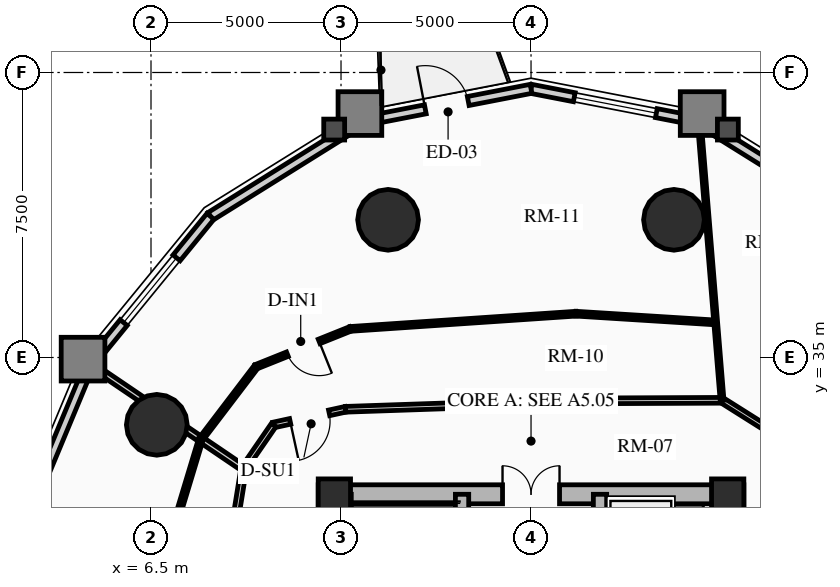
"""IFC4 building model, lengths in metres.
Left out: names, types, materials, properties, quantities, classifications, styles, units other than length and angle.
Written with IfcOpenShell. Run it as: python <this file> out.ifc"""

import sys

from ifc_helpers import new_model, si_unit, direction, frame, frame_2d, origin, origin_2d, place, context, subcontext, project, spatial, rectangle, circle, extrude, source, transform, mapped, element, fill, save


model = new_model("IFC4")
c1 = context("Model", 3, precision=1e-05, world=origin(), true_north=direction((0.0, 1.0)))
c2 = subcontext(c1, "Body", "Model", "MODEL_VIEW")
j1 = project(units=[si_unit("LENGTHUNIT", "METRE"), si_unit("PLANEANGLEUNIT", "RADIAN")], contexts=[c1])
p1 = place(None, origin())
s1 = spatial("IfcSite", under=j1, at=p1, CompositionType="ELEMENT")
p2 = place(p1, origin())
s2 = spatial("IfcBuilding", under=s1, at=p2, CompositionType="ELEMENT")
p3 = place(p2, frame((0.0, 0.0, 22.0)))
s3 = spatial("IfcBuildingStorey", under=s2, at=p3, CompositionType="ELEMENT", Elevation=22.0)
for number, where, z_axis, x_axis in (
    (1, (11.15, 17.35, 0.0), (0.0, 0.0, 1.0), (0.0, 1.0, 0.0)),
    (2, (21.85, 17.35, 0.0), (0.0, 0.0, 1.0), (0.0, 1.0, 0.0)),
):
    element("IfcWall", number, at=place(p3, frame(where, z_axis=z_axis, x_axis=x_axis)), inside=s3, PredefinedType="SHEAR", context=c2, shape_type="SweptSolid", body=[
        extrude(rectangle(XDim=14.3, YDim=0.5, at=frame_2d((7.15, 0.0))), origin(), (0.0, 0.0, 1.0), 2.91),
    ])
p4 = place(p3, frame((11.15, 31.4, 0.0), z_axis=(0.0, 0.0, 1.0), x_axis=(1.0, 0.0, 0.0)))
e3 = element("IfcWall", 3, at=p4, inside=s3, PredefinedType="SHEAR", context=c2, shape_type="SweptSolid", body=[
    extrude(rectangle(XDim=10.7, YDim=0.5, at=frame_2d((5.35, 0.0))), origin(), (0.0, 0.0, 1.0), 2.91),
])
m1 = source(origin(), c2, "Body", "SweptSolid", [
    extrude(rectangle(XDim=1.5, YDim=2.02, at=frame_2d((0.75, 1.01))), frame((0.0, 0.26, 0.0), z_axis=(0.0, -1.0, 0.0), x_axis=(1.0, 0.0, 0.0)), (0.0, 0.0, 1.0), 0.52),
])
p5 = place(p4, frame((4.6, 0.0, 0.0)))
e4 = element("IfcOpeningElement", 4, at=p5, cuts=e3, PredefinedType="OPENING", context=c2, shape_type="MappedRepresentation", body=[
    mapped(m1, transform((0.0, 0.0, 0.0), x_axis=(1.0, 0.0, 0.0), y_axis=(0.0, 1.0, 0.0), z_axis=(0.0, 0.0, 1.0), scale=1.0)),
])
p6 = place(p3, frame((14.685, 17.6, 0.0), z_axis=(0.0, 0.0, 1.0), x_axis=(0.0, 1.0, 0.0)))
e5 = element("IfcWall", 5, at=p6, inside=s3, PredefinedType="SHEAR", context=c2, shape_type="SweptSolid", body=[
    extrude(rectangle(XDim=13.8, YDim=0.35, at=frame_2d((6.9, 0.0))), origin(), (0.0, 0.0, 1.0), 2.91),
])
m2 = source(origin(), c2, "Body", "SweptSolid", [
    extrude(rectangle(XDim=1.1, YDim=2.015, at=frame_2d((0.55, 1.007))), frame((0.0, 0.185, 0.0), z_axis=(0.0, -1.0, 0.0), x_axis=(1.0, 0.0, 0.0)), (0.0, 0.0, 1.0), 0.37),
])
p7 = place(p6, frame((4.9, 0.0, 0.0)))
e6 = element("IfcOpeningElement", 6, at=p7, cuts=e5, PredefinedType="OPENING", context=c2, shape_type="MappedRepresentation", body=[
    mapped(m2, transform((0.0, 0.0, 0.0), x_axis=(1.0, 0.0, 0.0), y_axis=(0.0, 1.0, 0.0), z_axis=(0.0, 0.0, 1.0), scale=1.0)),
])
m3 = source(origin(), c2, "Body", "SweptSolid", [
    extrude(rectangle(XDim=1.15, YDim=2.02, at=frame_2d((0.575, 1.01))), frame((0.0, 0.185, 0.0), z_axis=(0.0, -1.0, 0.0), x_axis=(1.0, 0.0, 0.0)), (0.0, 0.0, 1.0), 0.37),
])
p8 = place(p6, frame((7.32, 0.0, 0.0)))
e7 = element("IfcOpeningElement", 7, at=p8, cuts=e5, PredefinedType="OPENING", context=c2, shape_type="MappedRepresentation", body=[
    mapped(m3, transform((0.0, 0.0, 0.0), x_axis=(1.0, 0.0, 0.0), y_axis=(0.0, 1.0, 0.0), z_axis=(0.0, 0.0, 1.0), scale=1.0)),
])
p9 = place(p3, frame((18.315, 17.6, 0.0), z_axis=(0.0, 0.0, 1.0), x_axis=(0.0, 1.0, 0.0)))
e8 = element("IfcWall", 8, at=p9, inside=s3, PredefinedType="SHEAR", context=c2, shape_type="SweptSolid", body=[
    extrude(rectangle(XDim=13.8, YDim=0.35, at=frame_2d((6.9, 0.0))), origin(), (0.0, 0.0, 1.0), 2.91),
])
p10 = place(p9, frame((10.025, 0.0, 0.0)))
e9 = element("IfcOpeningElement", 9, at=p10, cuts=e8, PredefinedType="OPENING", context=c2, shape_type="MappedRepresentation", body=[
    mapped(m2, transform((0.0, 0.0, 0.0), x_axis=(1.0, 0.0, 0.0), y_axis=(0.0, 1.0, 0.0), z_axis=(0.0, 0.0, 1.0), scale=1.0)),
])
p11 = place(p9, frame((12.025, 0.0, 0.0)))
e10 = element("IfcOpeningElement", 10, at=p11, cuts=e8, PredefinedType="OPENING", context=c2, shape_type="MappedRepresentation", body=[
    mapped(m2, transform((0.0, 0.0, 0.0), x_axis=(1.0, 0.0, 0.0), y_axis=(0.0, 1.0, 0.0), z_axis=(0.0, 0.0, 1.0), scale=1.0)),
])
p12 = place(p9, frame((5.33, 0.0, 0.0)))
e11 = element("IfcOpeningElement", 11, at=p12, cuts=e8, PredefinedType="OPENING", context=c2, shape_type="MappedRepresentation", body=[
    mapped(m3, transform((0.0, 0.0, 0.0), x_axis=(1.0, 0.0, 0.0), y_axis=(0.0, 1.0, 0.0), z_axis=(0.0, 0.0, 1.0), scale=1.0)),
])
p13 = place(p3, frame((11.595, 24.655, 0.0), z_axis=(0.0, 0.0, 1.0), x_axis=(0.0, 1.0, 0.0)))
e12 = element("IfcWall", 12, at=p13, inside=s3, PredefinedType="SHEAR", context=c2, shape_type="SweptSolid", body=[
    extrude(rectangle(XDim=6.745, YDim=0.35, at=frame_2d((3.373, 0.0))), origin(), (0.0, 0.0, 1.0), 2.91),
])
for number, where, z_axis, x_axis in (
    (13, (11.325, 31.38, 0.0), (0.0, 0.0, 1.0), (1.0, 0.0, 0.0)),
    (14, (21.675, 31.38, 0.0), (0.0, 0.0, 1.0), (1.0, 0.0, 0.0)),
):
    element("IfcColumn", number, at=place(p3, frame(where, z_axis=z_axis, x_axis=x_axis)), inside=s3, PredefinedType="COLUMN", context=c2, shape_type="SweptSolid", body=[
        extrude(rectangle(XDim=0.85, YDim=0.85, at=origin_2d()), origin(), (0.0, 0.0, 1.0), 2.91),
    ])
for number, where, z_axis, x_axis in (
    (15, (20.261, 38.623, 0.0), (0.0, 0.0, 1.0), (1.0, 0.0, 0.0)),
    (16, (12.739, 38.623, 0.0), (0.0, 0.0, 1.0), (1.0, 0.0, 0.0)),
    (17, (6.653, 33.229, 0.0), (0.0, 0.0, 1.0), (1.0, 0.0, 0.0)),
):
    element("IfcColumn", number, at=place(p3, frame(where, z_axis=z_axis, x_axis=x_axis)), inside=s3, PredefinedType="USERDEFINED", context=c2, shape_type="SweptSolid", body=[
        extrude(circle(Radius=0.8, at=origin_2d()), origin(), (0.0, 0.0, 1.0), 2.91),
    ])
p14 = place(p3, frame((20.935, 41.21, 0.0), z_axis=(0.0, 0.0, 1.0), x_axis=(0.848422721916, -0.529319265601, 0.0)))
e18 = element("IfcWall", 18, at=p14, inside=s3, PredefinedType="SOLIDWALL", context=c2, shape_type="SweptSolid", body=[
    extrude(rectangle(XDim=4.715, YDim=0.24, at=frame_2d((2.357, 0.0))), origin(), (0.0, 0.0, 1.0), 2.073),
])
p15 = place(p3, frame((16.5, 42.07, 0.0), z_axis=(0.0, 0.0, 1.0), x_axis=(0.981717351035, -0.190344536766, 0.0)))
e19 = element("IfcWall", 19, at=p15, inside=s3, PredefinedType="SOLIDWALL", context=c2, shape_type="SweptSolid", body=[
    extrude(rectangle(XDim=4.517, YDim=0.24, at=frame_2d((2.259, 0.0))), origin(), (0.0, 0.0, 1.0), 2.073),
])
m4 = source(origin(), c2, "Body", "SweptSolid", [
    extrude(rectangle(XDim=2.2, YDim=1.35, at=frame_2d((1.1, 0.675))), frame((0.0, 0.13, 0.0), z_axis=(0.0, -1.0, 0.0), x_axis=(1.0, 0.0, 0.0)), (0.0, 0.0, 1.0), 0.26),
])
p16 = place(p15, frame((1.159, 0.0, 0.65)))
e20 = element("IfcOpeningElement", 20, at=p16, cuts=e19, PredefinedType="OPENING", context=c2, shape_type="MappedRepresentation", body=[
    mapped(m4, transform((0.0, 0.0, 0.0), x_axis=(1.0, 0.0, 0.0), y_axis=(0.0, 1.0, 0.0), z_axis=(0.0, 0.0, 1.0), scale=1.0)),
])
p17 = place(p3, frame((12.065, 41.21, 0.0), z_axis=(0.0, 0.0, 1.0), x_axis=(0.981717351035, 0.190344536766, 0.0)))
e21 = element("IfcWall", 21, at=p17, inside=s3, PredefinedType="SOLIDWALL", context=c2, shape_type="SweptSolid", body=[
    extrude(rectangle(XDim=4.517, YDim=0.24, at=frame_2d((2.259, 0.0))), origin(), (0.0, 0.0, 1.0), 2.073),
])
m5 = source(origin(), c2, "Body", "SweptSolid", [
    extrude(rectangle(XDim=1.15, YDim=2.005, at=frame_2d((0.575, 1.002))), frame((0.0, 0.13, 0.0), z_axis=(0.0, -1.0, 0.0), x_axis=(1.0, 0.0, 0.0)), (0.0, 0.0, 1.0), 0.26),
])
p18 = place(p17, frame((1.684, 0.0, 0.0)))
e22 = element("IfcOpeningElement", 22, at=p18, cuts=e21, PredefinedType="OPENING", context=c2, shape_type="MappedRepresentation", body=[
    mapped(m5, transform((0.0, 0.0, 0.0), x_axis=(1.0, 0.0, 0.0), y_axis=(0.0, 1.0, 0.0), z_axis=(0.0, 0.0, 1.0), scale=1.0)),
])
p19 = place(p3, frame((8.065, 38.714, 0.0), z_axis=(0.0, 0.0, 1.0), x_axis=(0.848422721916, 0.529319265601, 0.0)))
e23 = element("IfcWall", 23, at=p19, inside=s3, PredefinedType="SOLIDWALL", context=c2, shape_type="SweptSolid", body=[
    extrude(rectangle(XDim=4.715, YDim=0.24, at=frame_2d((2.357, 0.0))), origin(), (0.0, 0.0, 1.0), 2.073),
])
p20 = place(p3, frame((4.89, 34.827, 0.0), z_axis=(0.0, 0.0, 1.0), x_axis=(0.632588557044, 0.774488035735, 0.0)))
e24 = element("IfcWall", 24, at=p20, inside=s3, PredefinedType="SOLIDWALL", context=c2, shape_type="SweptSolid", body=[
    extrude(rectangle(XDim=5.019, YDim=0.24, at=frame_2d((2.509, 0.0))), origin(), (0.0, 0.0, 1.0), 2.073),
])
p21 = place(p20, frame((1.409, 0.0, 0.65)))
e25 = element("IfcOpeningElement", 25, at=p21, cuts=e24, PredefinedType="OPENING", context=c2, shape_type="MappedRepresentation", body=[
    mapped(m4, transform((0.0, 0.0, 0.0), x_axis=(1.0, 0.0, 0.0), y_axis=(0.0, 1.0, 0.0), z_axis=(0.0, 0.0, 1.0), scale=1.0)),
])
p22 = place(p3, frame((2.851, 29.929, 0.0), z_axis=(0.0, 0.0, 1.0), x_axis=(0.384255919668, 0.923226618009, 0.0)))
e26 = element("IfcWall", 26, at=p22, inside=s3, PredefinedType="SOLIDWALL", context=c2, shape_type="SweptSolid", body=[
    extrude(rectangle(XDim=5.305, YDim=0.24, at=frame_2d((2.653, 0.0))), origin(), (0.0, 0.0, 1.0), 2.073),
])
p23 = place(p3, frame((22.877, 33.022, 0.0), z_axis=(0.0, 0.0, 1.0), x_axis=(-0.845895608855, 0.533348496689, 0.0)))
e27 = element("IfcWall", 27, at=p23, inside=s3, PredefinedType="PARTITIONING", context=c2, shape_type="SweptSolid", body=[
    extrude(rectangle(XDim=1.597, YDim=0.15, at=frame_2d((0.798, 0.0))), origin(), (0.0, 0.0, 1.0), 2.205),
])
p24 = place(p3, frame((21.527, 33.873, 0.0), z_axis=(0.0, 0.0, 1.0), x_axis=(-0.999991838845, -0.004040079574, 0.0)))
e28 = element("IfcWall", 28, at=p24, inside=s3, PredefinedType="PARTITIONING", context=c2, shape_type="SweptSolid", body=[
    extrude(rectangle(XDim=3.384, YDim=0.15, at=frame_2d((1.692, 0.0))), origin(), (0.0, 0.0, 1.0), 2.159),
])
p25 = place(p3, frame((18.143, 33.86, 0.0), z_axis=(0.0, 0.0, 1.0), x_axis=(-0.999419208319, -0.034077060363, 0.0)))
e29 = element("IfcWall", 29, at=p25, inside=s3, PredefinedType="PARTITIONING", context=c2, shape_type="SweptSolid", body=[
    extrude(rectangle(XDim=6.527, YDim=0.15, at=frame_2d((3.263, 0.0))), origin(), (0.0, 0.0, 1.0), 2.159),
])
p26 = place(p3, frame((11.62, 33.637, 0.0), z_axis=(0.0, 0.0, 1.0), x_axis=(-0.97702579435, -0.213121085711, 0.0)))
e30 = element("IfcWall", 30, at=p26, inside=s3, PredefinedType="PARTITIONING", context=c2, shape_type="SweptSolid", body=[
    extrude(rectangle(XDim=1.935, YDim=0.15, at=frame_2d((0.967, 0.0))), origin(), (0.0, 0.0, 1.0), 2.159),
])
m6 = source(origin(), c2, "Body", "SweptSolid", [
    extrude(rectangle(XDim=1.05, YDim=2.015, at=frame_2d((0.525, 1.007))), frame((0.0, 0.085, 0.0), z_axis=(0.0, -1.0, 0.0), x_axis=(1.0, 0.0, 0.0)), (0.0, 0.0, 1.0), 0.17),
])
p27 = place(p26, frame((0.442, 0.0, 0.0)))
e31 = element("IfcOpeningElement", 31, at=p27, cuts=e30, PredefinedType="OPENING", context=c2, shape_type="MappedRepresentation", body=[
    mapped(m6, transform((0.0, 0.0, 0.0), x_axis=(1.0, 0.0, 0.0), y_axis=(0.0, 1.0, 0.0), z_axis=(0.0, 0.0, 1.0), scale=1.0)),
])
p28 = place(p3, frame((9.729, 33.225, 0.0), z_axis=(0.0, 0.0, 1.0), x_axis=(-0.567183649484, -0.82359134755, 0.0)))
e32 = element("IfcWall", 32, at=p28, inside=s3, PredefinedType="PARTITIONING", context=c2, shape_type="SweptSolid", body=[
    extrude(rectangle(XDim=1.392, YDim=0.15, at=frame_2d((0.696, 0.0))), origin(), (0.0, 0.0, 1.0), 2.159),
])
p29 = place(p3, frame((8.94, 32.078, 0.0), z_axis=(0.0, 0.0, 1.0), x_axis=(-0.159148467753, -0.98725466077, 0.0)))
e33 = element("IfcWall", 33, at=p29, inside=s3, PredefinedType="PARTITIONING", context=c2, shape_type="SweptSolid", body=[
    extrude(rectangle(XDim=1.554, YDim=0.15, at=frame_2d((0.777, 0.0))), origin(), (0.0, 0.0, 1.0), 2.205),
])
p30 = place(p3, frame((21.527, 33.873, 0.0), z_axis=(0.0, 0.0, 1.0), x_axis=(-0.081501553037, 0.996673214676, 0.0)))
e34 = element("IfcWall", 34, at=p30, inside=s3, PredefinedType="MOVABLE", context=c2, shape_type="SweptSolid", body=[
    extrude(rectangle(XDim=7.342, YDim=0.1, at=frame_2d((3.671, 0.0))), origin(), (0.0, 0.0, 1.0), 2.073),
])
p31 = place(p3, frame((8.94, 32.078, 0.0), z_axis=(0.0, 0.0, 1.0), x_axis=(-0.827476605417, 0.561500193666, 0.0)))
e35 = element("IfcWall", 35, at=p31, inside=s3, PredefinedType="PARTITIONING", context=c2, shape_type="SweptSolid", body=[
    extrude(rectangle(XDim=4.875, YDim=0.16, at=frame_2d((2.438, 0.0))), origin(), (0.0, 0.0, 1.0), 2.073),
])
p32 = place(p3, frame((21.359, 35.922, 0.0), z_axis=(0.0, 0.0, 1.0), x_axis=(-0.998040956573, 0.062563959294, 0.0)))
e36 = element("IfcWall", 36, at=p32, inside=s3, PredefinedType="PARTITIONING", context=c2, shape_type="SweptSolid", body=[
    extrude(rectangle(XDim=3.684, YDim=0.125, at=frame_2d((1.842, 0.0))), origin(), (0.0, 0.0, 1.0), 2.159),
])
p33 = place(p3, frame((17.683, 36.153, 0.0), z_axis=(0.0, 0.0, 1.0), x_axis=(-0.997730540088, -0.067333270944, 0.0)))
e37 = element("IfcWall", 37, at=p33, inside=s3, PredefinedType="PARTITIONING", context=c2, shape_type="SweptSolid", body=[
    extrude(rectangle(XDim=5.95, YDim=0.125, at=frame_2d((2.975, 0.0))), origin(), (0.0, 0.0, 1.0), 2.159),
])
p34 = place(p3, frame((11.746, 35.752, 0.0), z_axis=(0.0, 0.0, 1.0), x_axis=(-0.928091790064, -0.372351486119, 0.0)))
e38 = element("IfcWall", 38, at=p34, inside=s3, PredefinedType="PARTITIONING", context=c2, shape_type="SweptSolid", body=[
    extrude(rectangle(XDim=2.672, YDim=0.125, at=frame_2d((1.336, 0.0))), origin(), (0.0, 0.0, 1.0), 2.205),
])
m7 = source(origin(), c2, "Body", "SweptSolid", [
    extrude(rectangle(XDim=0.9, YDim=2.005, at=frame_2d((0.45, 1.002))), frame((0.0, 0.073, 0.0), z_axis=(0.0, -1.0, 0.0), x_axis=(1.0, 0.0, 0.0)), (0.0, 0.0, 1.0), 0.145),
])
p35 = place(p34, frame((0.886, 0.0, 0.0)))
e39 = element("IfcOpeningElement", 39, at=p35, cuts=e38, PredefinedType="OPENING", context=c2, shape_type="MappedRepresentation", body=[
    mapped(m7, transform((0.0, 0.0, 0.0), x_axis=(1.0, 0.0, 0.0), y_axis=(0.0, 1.0, 0.0), z_axis=(0.0, 0.0, 1.0), scale=1.0)),
])
p36 = place(p3, frame((9.267, 34.757, 0.0), z_axis=(0.0, 0.0, 1.0), x_axis=(-0.60573716219, -0.795664810295, 0.0)))
e40 = element("IfcWall", 40, at=p36, inside=s3, PredefinedType="PARTITIONING", context=c2, shape_type="SweptSolid", body=[
    extrude(rectangle(XDim=2.404, YDim=0.125, at=frame_2d((1.202, 0.0))), origin(), (0.0, 0.0, 1.0), 2.159),
])
p37 = place(p3, frame((7.811, 32.845, 0.0), z_axis=(0.0, 0.0, 1.0), x_axis=(-0.289357304294, -0.957221160679, 0.0)))
e41 = element("IfcWall", 41, at=p37, inside=s3, PredefinedType="PARTITIONING", context=c2, shape_type="SweptSolid", body=[
    extrude(rectangle(XDim=2.585, YDim=0.125, at=frame_2d((1.292, 0.0))), origin(), (0.0, 0.0, 1.0), 2.159),
])
m8 = source(origin(), c2, "Body", "SweptSolid", [
    extrude(rectangle(XDim=2.2, YDim=1.35, at=frame_2d((1.1, 0.675))), frame((0.0, 0.03, 0.0), z_axis=(0.0, -1.0, 0.0), x_axis=(1.0, 0.0, 0.0)), (0.0, 0.0, 1.0), 0.06),
])
p38 = place(p16, origin())
e42 = element("IfcWindow", 42, at=p38, inside=s3, PartitioningType="DOUBLE_PANEL_VERTICAL", PredefinedType="WINDOW", context=c2, shape_type="MappedRepresentation", body=[
    mapped(m8, transform((0.0, 0.0, 0.0), x_axis=(1.0, 0.0, 0.0), y_axis=(0.0, 1.0, 0.0), z_axis=(0.0, 0.0, 1.0), scale=1.0)),
])
fill(e20, e42)
m9 = source(origin(), c2, "Body", "SweptSolid", [
    extrude(rectangle(XDim=1.15, YDim=2.005, at=frame_2d((0.575, 1.002))), frame((0.0, 0.025, 0.0), z_axis=(0.0, -1.0, 0.0), x_axis=(1.0, 0.0, 0.0)), (0.0, 0.0, 1.0), 0.05),
])
p39 = place(p18, origin())
e43 = element("IfcDoor", 43, at=p39, inside=s3, OperationType="SINGLE_SWING_LEFT", PredefinedType="DOOR", context=c2, shape_type="MappedRepresentation", body=[
    mapped(m9, transform((0.0, 0.0, 0.0), x_axis=(1.0, 0.0, 0.0), y_axis=(0.0, 1.0, 0.0), z_axis=(0.0, 0.0, 1.0), scale=1.0)),
])
fill(e22, e43)
p40 = place(p21, origin())
e44 = element("IfcWindow", 44, at=p40, inside=s3, PartitioningType="DOUBLE_PANEL_VERTICAL", PredefinedType="WINDOW", context=c2, shape_type="MappedRepresentation", body=[
    mapped(m8, transform((0.0, 0.0, 0.0), x_axis=(1.0, 0.0, 0.0), y_axis=(0.0, 1.0, 0.0), z_axis=(0.0, 0.0, 1.0), scale=1.0)),
])
fill(e25, e44)
m10 = source(origin(), c2, "Body", "SweptSolid", [
    extrude(rectangle(XDim=1.5, YDim=2.02, at=frame_2d((0.75, 1.01))), frame((0.0, 0.025, 0.0), z_axis=(0.0, -1.0, 0.0), x_axis=(1.0, 0.0, 0.0)), (0.0, 0.0, 1.0), 0.05),
])
p41 = place(p5, origin())
e45 = element("IfcDoor", 45, at=p41, inside=s3, OperationType="DOUBLE_DOOR_SINGLE_SWING", PredefinedType="DOOR", context=c2, shape_type="MappedRepresentation", body=[
    mapped(m10, transform((0.0, 0.0, 0.0), x_axis=(1.0, 0.0, 0.0), y_axis=(0.0, 1.0, 0.0), z_axis=(0.0, 0.0, 1.0), scale=1.0)),
])
fill(e4, e45)
m11 = source(origin(), c2, "Body", "SweptSolid", [
    extrude(rectangle(XDim=1.05, YDim=2.015, at=frame_2d((0.525, 1.007))), frame((0.0, 0.025, 0.0), z_axis=(0.0, -1.0, 0.0), x_axis=(1.0, 0.0, 0.0)), (0.0, 0.0, 1.0), 0.05),
])
p42 = place(p27, origin())
e46 = element("IfcDoor", 46, at=p42, inside=s3, OperationType="SINGLE_SWING_RIGHT", PredefinedType="DOOR", context=c2, shape_type="MappedRepresentation", body=[
    mapped(m11, transform((0.0, 0.0, 0.0), x_axis=(1.0, 0.0, 0.0), y_axis=(0.0, 1.0, 0.0), z_axis=(0.0, 0.0, 1.0), scale=1.0)),
])
fill(e31, e46)
m12 = source(origin(), c2, "Body", "SweptSolid", [
    extrude(rectangle(XDim=0.9, YDim=2.005, at=frame_2d((0.45, 1.002))), frame((0.0, 0.025, 0.0), z_axis=(0.0, -1.0, 0.0), x_axis=(1.0, 0.0, 0.0)), (0.0, 0.0, 1.0), 0.05),
])
p43 = place(p35, origin())
e47 = element("IfcDoor", 47, at=p43, inside=s3, OperationType="SINGLE_SWING_LEFT", PredefinedType="DOOR", context=c2, shape_type="MappedRepresentation", body=[
    mapped(m12, transform((0.0, 0.0, 0.0), x_axis=(1.0, 0.0, 0.0), y_axis=(0.0, 1.0, 0.0), z_axis=(0.0, 0.0, 1.0), scale=1.0)),
])
fill(e39, e47)
save(model, sys.argv[1])
